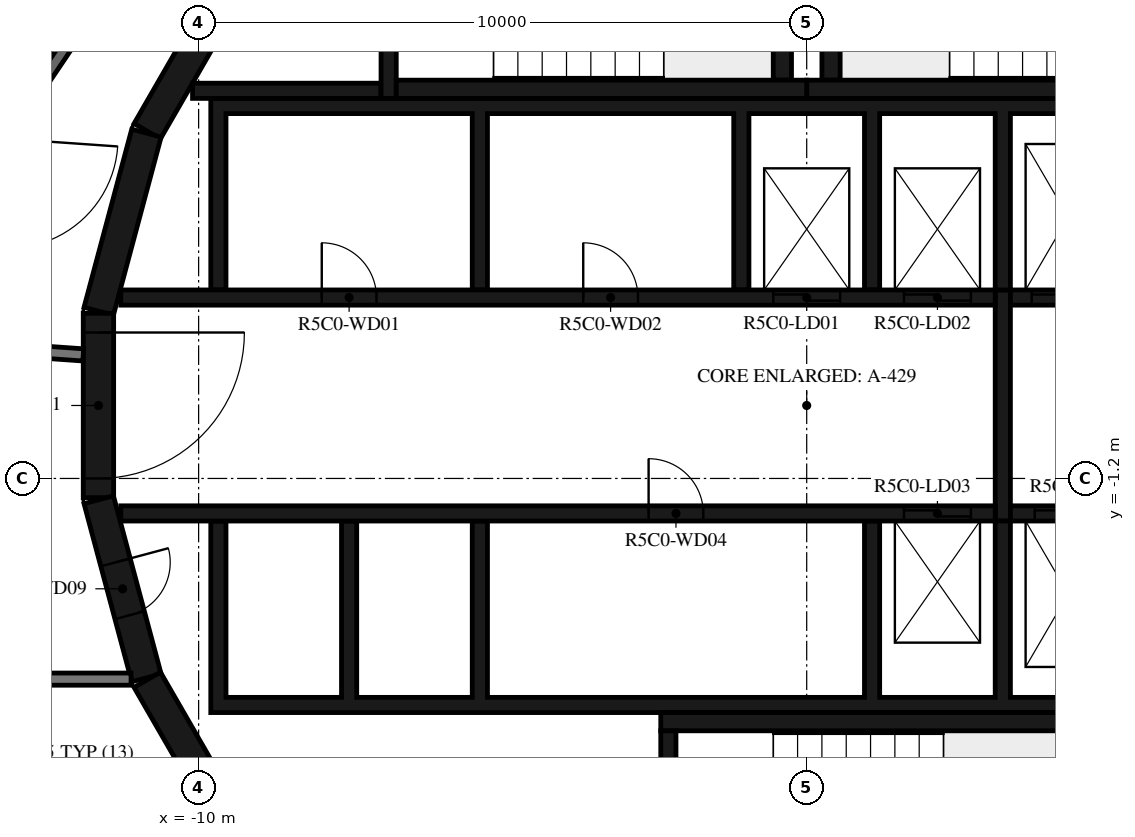
"""IFC4 building model, lengths in metres.
Left out: names, types, materials, properties, quantities, classifications, styles, units other than length and angle.
Written with IfcOpenShell. Run it as: python <this file> out.ifc"""

import sys

from ifc_helpers import new_model, si_unit, direction, frame, frame_2d, origin, place, context, subcontext, project, spatial, polyline, rectangle, outline, extrude, element, fill, save


model = new_model("IFC4")
c1 = context("Model", 3, precision=1e-05, world=origin(), true_north=direction((0.0, 1.0)))
c2 = subcontext(c1, "Body", "Model", "MODEL_VIEW")
j1 = project(units=[si_unit("LENGTHUNIT", "METRE"), si_unit("PLANEANGLEUNIT", "RADIAN")], contexts=[c1])
p1 = place(None, origin())
s1 = spatial("IfcSite", under=j1, at=p1, CompositionType="ELEMENT")
p2 = place(p1, origin())
s2 = spatial("IfcBuilding", under=s1, at=p2, CompositionType="ELEMENT")
p3 = place(p2, frame((0.0, 0.0, 209.4)))
s3 = spatial("IfcBuildingStorey", under=s2, at=p3, CompositionType="ELEMENT", Elevation=209.4)
for number, where, z_axis, x_axis in (
    (1, (-9.329, 7.137, 0.0), (0.0, 0.0, 1.0), (-0.5, -0.866, 0.0)),
    (2, (-10.858, 4.479, 0.0), (0.0, 0.0, 1.0), (-0.259, -0.966, 0.0)),
):
    element("IfcWall", number, at=place(p3, frame(where, z_axis=z_axis, x_axis=x_axis)), inside=s3, PredefinedType="SHEAR", context=c2, shape_type="SweptSolid", body=[
        extrude(rectangle(XDim=3.033, YDim=0.5, at=frame_2d((1.516, 0.0))), origin(), (0.0, 0.0, 1.0), 3.12),
    ])
p4 = place(p3, frame((-11.647, 1.516, 0.0), z_axis=(0.0, 0.0, 1.0), x_axis=(0.0, -1.0, 0.0)))
e3 = element("IfcWall", 3, at=p4, inside=s3, PredefinedType="SHEAR", context=c2, shape_type="SweptSolid", body=[
    extrude(rectangle(XDim=3.033, YDim=0.5, at=frame_2d((1.516, 0.0))), origin(), (0.0, 0.0, 1.0), 3.12),
])
p5 = place(p4, frame((0.316, 0.0, 0.0)))
e4 = element("IfcOpeningElement", 4, at=p5, cuts=e3, PredefinedType="OPENING", context=c2, shape_type="SweptSolid", body=[
    extrude(rectangle(XDim=2.4, YDim=2.1, at=frame_2d((1.2, 1.05))), frame((0.0, 0.26, 0.0), z_axis=(0.0, -1.0, 0.0), x_axis=(1.0, 0.0, 0.0)), (0.0, 0.0, 1.0), 0.52),
])
p6 = place(p3, frame((-11.643, -1.55, 0.0), z_axis=(0.0, 0.0, 1.0), x_axis=(0.258734743916, -0.965948410781, 0.0)))
e5 = element("IfcWall", 5, at=p6, inside=s3, PredefinedType="SHEAR", context=c2, shape_type="SweptSolid", body=[
    extrude(rectangle(XDim=3.033, YDim=0.5, at=frame_2d((1.516, 0.0))), origin(), (0.0, 0.0, 1.0), 3.12),
])
p7 = place(p6, frame((1.066, 0.0, 0.0)))
e6 = element("IfcOpeningElement", 6, at=p7, cuts=e5, PredefinedType="OPENING", context=c2, shape_type="SweptSolid", body=[
    extrude(rectangle(XDim=0.9, YDim=2.1, at=frame_2d((0.45, 1.05))), frame((0.0, 0.26, 0.0), z_axis=(0.0, -1.0, 0.0), x_axis=(1.0, 0.0, 0.0)), (0.0, 0.0, 1.0), 0.52),
])
p8 = place(p3, frame((-10.845, -4.51, 0.0), z_axis=(0.0, 0.0, 1.0), x_axis=(0.500087131594, -0.865975092491, 0.0)))
e7 = element("IfcWall", 7, at=p8, inside=s3, PredefinedType="SHEAR", context=c2, shape_type="SweptSolid", body=[
    extrude(rectangle(XDim=3.033, YDim=0.5, at=frame_2d((1.516, 0.0))), origin(), (0.0, 0.0, 1.0), 3.12),
])
p9 = place(p3, frame((0.0, 5.2, 0.0), z_axis=(0.0, 0.0, 1.0), x_axis=(1.0, 0.0, 0.0)))
e8 = element("IfcWall", 8, at=p9, inside=s3, PredefinedType="SHEAR", context=c2, shape_type="SweptSolid", body=[
    extrude(rectangle(XDim=6.75, YDim=0.3, at=frame_2d((3.375, 0.0))), origin(), (0.0, 0.0, 1.0), 3.12),
])
p10 = place(p3, frame((0.4, 5.35, 0.0), z_axis=(0.0, 0.0, 1.0), x_axis=(0.0, 1.0, 0.0)))
e9 = element("IfcWall", 9, at=p10, inside=s3, PredefinedType="SHEAR", context=c2, shape_type="SweptSolid", body=[
    extrude(rectangle(XDim=3.32, YDim=0.3, at=frame_2d((1.66, 0.0))), origin(), (0.0, 0.0, 1.0), 3.12),
])
p11 = place(p3, frame((-6.75, 5.2, 0.0), z_axis=(0.0, 0.0, 1.0), x_axis=(1.0, 0.0, 0.0)))
e10 = element("IfcWall", 10, at=p11, inside=s3, PredefinedType="SHEAR", context=c2, shape_type="SweptSolid", body=[
    extrude(rectangle(XDim=6.75, YDim=0.3, at=frame_2d((3.375, 0.0))), origin(), (0.0, 0.0, 1.0), 3.12),
])
p12 = place(p3, frame((-0.4, 5.35, 0.0), z_axis=(0.0, 0.0, 1.0), x_axis=(0.0, 1.0, 0.0)))
e11 = element("IfcWall", 11, at=p12, inside=s3, PredefinedType="SHEAR", context=c2, shape_type="SweptSolid", body=[
    extrude(rectangle(XDim=3.32, YDim=0.3, at=frame_2d((1.66, 0.0))), origin(), (0.0, 0.0, 1.0), 3.12),
])
p13 = place(p3, frame((-6.875, 8.97, 0.0), z_axis=(0.0, 0.0, 1.0), x_axis=(0.0, -1.0, 0.0)))
e12 = element("IfcWall", 12, at=p13, inside=s3, PredefinedType="SHEAR", context=c2, shape_type="SweptSolid", body=[
    extrude(rectangle(XDim=3.92, YDim=0.25, at=frame_2d((1.96, 0.0))), origin(), (0.0, 0.0, 1.0), 3.12),
])
p14 = place(p13, frame((1.61, 0.0, 0.0)))
e13 = element("IfcOpeningElement", 13, at=p14, cuts=e12, PredefinedType="OPENING", context=c2, shape_type="SweptSolid", body=[
    extrude(rectangle(XDim=1.2, YDim=2.1, at=frame_2d((0.6, 1.05))), frame((0.0, 0.135, 0.0), z_axis=(0.0, -1.0, 0.0), x_axis=(1.0, 0.0, 0.0)), (0.0, 0.0, 1.0), 0.27),
])
p15 = place(p3, frame((-7.0, 5.175, 0.0), z_axis=(0.0, 0.0, 1.0), x_axis=(-1.0, 0.0, 0.0)))
e14 = element("IfcWall", 14, at=p15, inside=s3, PredefinedType="SHEAR", context=c2, shape_type="SweptSolid", body=[
    extrude(rectangle(XDim=3.1, YDim=0.25, at=frame_2d((1.55, 0.0))), origin(), (0.0, 0.0, 1.0), 3.12),
])
p16 = place(p3, frame((-2.275, -8.67, 0.0), z_axis=(0.0, 0.0, 1.0), x_axis=(0.0, 1.0, 0.0)))
e15 = element("IfcWall", 15, at=p16, inside=s3, PredefinedType="SHEAR", context=c2, shape_type="SweptSolid", body=[
    extrude(rectangle(XDim=3.32, YDim=0.25, at=frame_2d((1.66, 0.0))), origin(), (0.0, 0.0, 1.0), 3.12),
])
p17 = place(p3, frame((-2.4, -5.2, 0.0), z_axis=(0.0, 0.0, 1.0), x_axis=(1.0, 0.0, 0.0)))
e16 = element("IfcWall", 16, at=p17, inside=s3, PredefinedType="SHEAR", context=c2, shape_type="SweptSolid", body=[
    extrude(rectangle(XDim=7.05, YDim=0.3, at=frame_2d((3.525, 0.0))), origin(), (0.0, 0.0, 1.0), 3.12),
])
p18 = place(p3, origin())
e17 = element("IfcWall", 17, at=p18, inside=s3, PredefinedType="SHEAR", context=c2, shape_type="SweptSolid", body=[
    extrude(outline(polyline([(-9.55, 4.8), (-5.5, 4.8), (-5.5, 1.9), (-5.25, 1.9), (-5.25, 4.8), (-1.2, 4.8), (-1.2, 1.9), (-0.95, 1.9), (-0.95, 4.8), (0.95, 4.8), (0.95, 1.9), (1.2, 1.9), (1.2, 4.8), (3.1, 4.8), (3.1, 1.9), (3.35, 1.9), (3.35, 4.8), (5.25, 4.8), (5.25, 1.9), (5.5, 1.9), (5.5, 4.8), (7.4, 4.8), (7.4, 1.9), (7.65, 1.9), (7.65, 4.8), (9.55, 4.8), (9.55, 1.9), (9.8, 1.9), (9.8, 4.8), (9.8, 5.05), (-9.8, 5.05), (-9.8, 4.8), (-9.8, 1.9), (-9.55, 1.9), (-9.55, 4.8)])), origin(), (0.0, 0.0, 1.0), 3.12),
])
p19 = place(p3, origin())
e18 = element("IfcWall", 18, at=p19, inside=s3, PredefinedType="SHEAR", context=c2, shape_type="SweptSolid", body=[
    extrude(outline(polyline([(9.8, -5.05), (9.8, -4.8), (9.8, -1.9), (9.55, -1.9), (9.55, -4.8), (7.65, -4.8), (7.65, -1.9), (7.4, -1.9), (7.4, -4.8), (5.5, -4.8), (5.5, -1.9), (5.25, -1.9), (5.25, -4.8), (3.35, -4.8), (3.35, -1.9), (3.1, -1.9), (3.1, -4.8), (1.2, -4.8), (1.2, -1.9), (0.95, -1.9), (0.95, -4.8), (-5.25, -4.8), (-5.25, -1.9), (-5.5, -1.9), (-5.5, -4.8), (-7.4, -4.8), (-7.4, -1.9), (-7.65, -1.9), (-7.65, -4.8), (-9.55, -4.8), (-9.55, -1.9), (-9.8, -1.9), (-9.8, -4.8), (-9.8, -5.05), (9.8, -5.05)])), origin(), (0.0, 0.0, 1.0), 3.12),
])
p20 = place(p3, frame((-11.28, 1.775, 0.0), z_axis=(0.0, 0.0, 1.0), x_axis=(1.0, 0.0, 0.0)))
e19 = element("IfcWall", 19, at=p20, inside=s3, PredefinedType="SHEAR", context=c2, shape_type="SweptSolid", body=[
    extrude(rectangle(XDim=14.38, YDim=0.25, at=frame_2d((7.19, 0.0))), origin(), (0.0, 0.0, 1.0), 3.12),
])
p21 = place(p20, frame((10.73, 0.0, 0.0)))
e20 = element("IfcOpeningElement", 20, at=p21, cuts=e19, PredefinedType="OPENING", context=c2, shape_type="SweptSolid", body=[
    extrude(rectangle(XDim=1.1, YDim=2.1, at=frame_2d((0.55, 1.05))), frame((0.0, 0.135, 0.0), z_axis=(0.0, -1.0, 0.0), x_axis=(1.0, 0.0, 0.0)), (0.0, 0.0, 1.0), 0.27),
])
p22 = place(p20, frame((12.88, 0.0, 0.0)))
e21 = element("IfcOpeningElement", 21, at=p22, cuts=e19, PredefinedType="OPENING", context=c2, shape_type="SweptSolid", body=[
    extrude(rectangle(XDim=1.1, YDim=2.1, at=frame_2d((0.55, 1.05))), frame((0.0, 0.135, 0.0), z_axis=(0.0, -1.0, 0.0), x_axis=(1.0, 0.0, 0.0)), (0.0, 0.0, 1.0), 0.27),
])
p23 = place(p20, frame((3.305, 0.0, 0.0)))
e22 = element("IfcOpeningElement", 22, at=p23, cuts=e19, PredefinedType="OPENING", context=c2, shape_type="SweptSolid", body=[
    extrude(rectangle(XDim=0.9, YDim=2.1, at=frame_2d((0.45, 1.05))), frame((0.0, 0.135, 0.0), z_axis=(0.0, -1.0, 0.0), x_axis=(1.0, 0.0, 0.0)), (0.0, 0.0, 1.0), 0.27),
])
p24 = place(p20, frame((7.605, 0.0, 0.0)))
e23 = element("IfcOpeningElement", 23, at=p24, cuts=e19, PredefinedType="OPENING", context=c2, shape_type="SweptSolid", body=[
    extrude(rectangle(XDim=0.9, YDim=2.1, at=frame_2d((0.45, 1.05))), frame((0.0, 0.135, 0.0), z_axis=(0.0, -1.0, 0.0), x_axis=(1.0, 0.0, 0.0)), (0.0, 0.0, 1.0), 0.27),
])
p25 = place(p3, frame((3.35, 1.775, 0.0), z_axis=(0.0, 0.0, 1.0), x_axis=(1.0, 0.0, 0.0)))
e24 = element("IfcWall", 24, at=p25, inside=s3, PredefinedType="SHEAR", context=c2, shape_type="SweptSolid", body=[
    extrude(rectangle(XDim=7.93, YDim=0.25, at=frame_2d((3.965, 0.0))), origin(), (0.0, 0.0, 1.0), 3.12),
])
p26 = place(p25, frame((0.35, 0.0, 0.0)))
e25 = element("IfcOpeningElement", 25, at=p26, cuts=e24, PredefinedType="OPENING", context=c2, shape_type="SweptSolid", body=[
    extrude(rectangle(XDim=1.2, YDim=2.4, at=frame_2d((0.6, 1.2))), frame((0.0, 0.135, 0.0), z_axis=(0.0, -1.0, 0.0), x_axis=(1.0, 0.0, 0.0)), (0.0, 0.0, 1.0), 0.27),
])
p27 = place(p25, frame((2.5, 0.0, 0.0)))
e26 = element("IfcOpeningElement", 26, at=p27, cuts=e24, PredefinedType="OPENING", context=c2, shape_type="SweptSolid", body=[
    extrude(rectangle(XDim=1.2, YDim=2.4, at=frame_2d((0.6, 1.2))), frame((0.0, 0.135, 0.0), z_axis=(0.0, -1.0, 0.0), x_axis=(1.0, 0.0, 0.0)), (0.0, 0.0, 1.0), 0.27),
])
p28 = place(p25, frame((4.8, 0.0, 0.0)))
e27 = element("IfcOpeningElement", 27, at=p28, cuts=e24, PredefinedType="OPENING", context=c2, shape_type="SweptSolid", body=[
    extrude(rectangle(XDim=0.9, YDim=2.1, at=frame_2d((0.45, 1.05))), frame((0.0, 0.135, 0.0), z_axis=(0.0, -1.0, 0.0), x_axis=(1.0, 0.0, 0.0)), (0.0, 0.0, 1.0), 0.27),
])
p29 = place(p3, frame((-11.28, -1.775, 0.0), z_axis=(0.0, 0.0, 1.0), x_axis=(1.0, 0.0, 0.0)))
e28 = element("IfcWall", 28, at=p29, inside=s3, PredefinedType="SHEAR", context=c2, shape_type="SweptSolid", body=[
    extrude(rectangle(XDim=14.38, YDim=0.25, at=frame_2d((7.19, 0.0))), origin(), (0.0, 0.0, 1.0), 3.12),
])
p30 = place(p29, frame((12.88, 0.0, 0.0)))
e29 = element("IfcOpeningElement", 29, at=p30, cuts=e28, PredefinedType="OPENING", context=c2, shape_type="SweptSolid", body=[
    extrude(rectangle(XDim=1.1, YDim=2.1, at=frame_2d((0.55, 1.05))), frame((0.0, 0.135, 0.0), z_axis=(0.0, -1.0, 0.0), x_axis=(1.0, 0.0, 0.0)), (0.0, 0.0, 1.0), 0.27),
])
p31 = place(p29, frame((8.68, 0.0, 0.0)))
e30 = element("IfcOpeningElement", 30, at=p31, cuts=e28, PredefinedType="OPENING", context=c2, shape_type="SweptSolid", body=[
    extrude(rectangle(XDim=0.9, YDim=2.1, at=frame_2d((0.45, 1.05))), frame((0.0, 0.135, 0.0), z_axis=(0.0, -1.0, 0.0), x_axis=(1.0, 0.0, 0.0)), (0.0, 0.0, 1.0), 0.27),
])
p32 = place(p3, frame((3.35, -1.775, 0.0), z_axis=(0.0, 0.0, 1.0), x_axis=(1.0, 0.0, 0.0)))
e31 = element("IfcWall", 31, at=p32, inside=s3, PredefinedType="SHEAR", context=c2, shape_type="SweptSolid", body=[
    extrude(rectangle(XDim=7.93, YDim=0.25, at=frame_2d((3.965, 0.0))), origin(), (0.0, 0.0, 1.0), 3.12),
])
p33 = place(p32, frame((0.4, 0.0, 0.0)))
e32 = element("IfcOpeningElement", 32, at=p33, cuts=e31, PredefinedType="OPENING", context=c2, shape_type="SweptSolid", body=[
    extrude(rectangle(XDim=1.1, YDim=2.4, at=frame_2d((0.55, 1.2))), frame((0.0, 0.135, 0.0), z_axis=(0.0, -1.0, 0.0), x_axis=(1.0, 0.0, 0.0)), (0.0, 0.0, 1.0), 0.27),
])
p34 = place(p32, frame((2.55, 0.0, 0.0)))
e33 = element("IfcOpeningElement", 33, at=p34, cuts=e31, PredefinedType="OPENING", context=c2, shape_type="SweptSolid", body=[
    extrude(rectangle(XDim=1.1, YDim=2.4, at=frame_2d((0.55, 1.2))), frame((0.0, 0.135, 0.0), z_axis=(0.0, -1.0, 0.0), x_axis=(1.0, 0.0, 0.0)), (0.0, 0.0, 1.0), 0.27),
])
p35 = place(p32, frame((4.7, 0.0, 0.0)))
e34 = element("IfcOpeningElement", 34, at=p35, cuts=e31, PredefinedType="OPENING", context=c2, shape_type="SweptSolid", body=[
    extrude(rectangle(XDim=1.1, YDim=2.4, at=frame_2d((0.55, 1.2))), frame((0.0, 0.135, 0.0), z_axis=(0.0, -1.0, 0.0), x_axis=(1.0, 0.0, 0.0)), (0.0, 0.0, 1.0), 0.27),
])
p36 = place(p3, frame((3.225, -1.9, 0.0), z_axis=(0.0, 0.0, 1.0), x_axis=(0.0, 1.0, 0.0)))
e35 = element("IfcWall", 35, at=p36, inside=s3, PredefinedType="SHEAR", context=c2, shape_type="SweptSolid", body=[
    extrude(rectangle(XDim=3.8, YDim=0.25, at=frame_2d((1.9, 0.0))), origin(), (0.0, 0.0, 1.0), 3.12),
])
p37 = place(p3, frame((-13.367, 0.935, 0.0), z_axis=(0.0, 0.0, 1.0), x_axis=(0.997553656289, -0.069904955655, 0.0)))
e36 = element("IfcWall", 36, at=p37, inside=s3, PredefinedType="STANDARD", context=c2, shape_type="SweptSolid", body=[
    extrude(rectangle(XDim=1.474, YDim=0.2, at=frame_2d((0.737, 0.0))), origin(), (0.0, 0.0, 1.0), 3.12),
])
p38 = place(p3, frame((-9.101, 10.47, 0.0), z_axis=(0.0, 0.0, 1.0), x_axis=(-0.559195469534, -0.829035841718, 0.0)))
e37 = element("IfcWall", 37, at=p38, inside=s3, PredefinedType="STANDARD", context=c2, shape_type="SweptSolid", body=[
    extrude(rectangle(XDim=7.181, YDim=0.2, at=frame_2d((3.591, 0.0))), origin(), (0.0, 0.0, 1.0), 3.12),
])
p39 = place(p38, frame((1.0, 0.0, 0.0)))
e38 = element("IfcOpeningElement", 38, at=p39, cuts=e37, PredefinedType="OPENING", context=c2, shape_type="SweptSolid", body=[
    extrude(rectangle(XDim=1.0, YDim=2.1, at=frame_2d((0.5, 1.05))), frame((0.0, 0.11, 0.0), z_axis=(0.0, -1.0, 0.0), x_axis=(1.0, 0.0, 0.0)), (0.0, 0.0, 1.0), 0.22),
])
p40 = place(p3, frame((-18.55, -4.5, 0.0), z_axis=(0.0, 0.0, 1.0), x_axis=(1.0, 0.0, 0.0)))
e39 = element("IfcWall", 39, at=p40, inside=s3, PredefinedType="STANDARD", context=c2, shape_type="SweptSolid", body=[
    extrude(rectangle(XDim=7.438, YDim=0.2, at=frame_2d((3.719, 0.0))), origin(), (0.0, 0.0, 1.0), 3.12),
])
p41 = place(p3, frame((-10.12, 11.642, 0.0), z_axis=(0.0, 0.0, 1.0), x_axis=(-0.55920080659, -0.829032241779, 0.0)))
e40 = element("IfcWall", 40, at=p41, inside=s3, PredefinedType="PARTITIONING", context=c2, shape_type="SweptSolid", body=[
    extrude(rectangle(XDim=7.985, YDim=0.12, at=frame_2d((3.992, 0.0))), origin(), (0.0, 0.0, 1.0), 3.12),
])
p42 = place(p41, frame((4.346, 0.0, 0.0)))
e41 = element("IfcOpeningElement", 41, at=p42, cuts=e40, PredefinedType="OPENING", context=c2, shape_type="SweptSolid", body=[
    extrude(rectangle(XDim=0.9, YDim=2.1, at=frame_2d((0.45, 1.05))), frame((0.0, 0.07, 0.0), z_axis=(0.0, -1.0, 0.0), x_axis=(1.0, 0.0, 0.0)), (0.0, 0.0, 1.0), 0.14),
])
p43 = place(p3, frame((-14.383, -4.5, 0.0), z_axis=(0.0, 0.0, 1.0), x_axis=(0.438393414895, -0.898783185077, 0.0)))
e42 = element("IfcWall", 42, at=p43, inside=s3, PredefinedType="PARTITIONING", context=c2, shape_type="SweptSolid", body=[
    extrude(rectangle(XDim=6.049, YDim=0.12, at=frame_2d((3.024, 0.0))), origin(), (0.0, 0.0, 1.0), 3.12),
])
p44 = place(p43, frame((0.4, 0.0, 0.0)))
e43 = element("IfcOpeningElement", 43, at=p44, cuts=e42, PredefinedType="OPENING", context=c2, shape_type="SweptSolid", body=[
    extrude(rectangle(XDim=0.8, YDim=2.1, at=frame_2d((0.4, 1.05))), frame((0.0, 0.07, 0.0), z_axis=(0.0, -1.0, 0.0), x_axis=(1.0, 0.0, 0.0)), (0.0, 0.0, 1.0), 0.14),
])
p45 = place(p5, origin())
e44 = element("IfcDoor", 44, at=p45, inside=s3, OperationType="DOUBLE_DOOR_SINGLE_SWING", PredefinedType="DOOR", context=c2, shape_type="SweptSolid", body=[
    extrude(rectangle(XDim=2.4, YDim=2.1, at=frame_2d((1.2, 1.05))), frame((0.0, 0.025, 0.0), z_axis=(0.0, -1.0, 0.0), x_axis=(1.0, 0.0, 0.0)), (0.0, 0.0, 1.0), 0.05),
])
fill(e4, e44)
p46 = place(p21, origin())
e45 = element("IfcDoor", 45, at=p46, inside=s3, OperationType="DOUBLE_DOOR_SLIDING", PredefinedType="DOOR", context=c2, shape_type="SweptSolid", body=[
    extrude(rectangle(XDim=1.1, YDim=2.1, at=frame_2d((0.55, 1.05))), frame((0.0, 0.025, 0.0), z_axis=(0.0, -1.0, 0.0), x_axis=(1.0, 0.0, 0.0)), (0.0, 0.0, 1.0), 0.05),
])
fill(e20, e45)
p47 = place(p22, origin())
e46 = element("IfcDoor", 46, at=p47, inside=s3, OperationType="DOUBLE_DOOR_SLIDING", PredefinedType="DOOR", context=c2, shape_type="SweptSolid", body=[
    extrude(rectangle(XDim=1.1, YDim=2.1, at=frame_2d((0.55, 1.05))), frame((0.0, 0.025, 0.0), z_axis=(0.0, -1.0, 0.0), x_axis=(1.0, 0.0, 0.0)), (0.0, 0.0, 1.0), 0.05),
])
fill(e21, e46)
p48 = place(p26, origin())
e47 = element("IfcDoor", 47, at=p48, inside=s3, OperationType="DOUBLE_DOOR_SLIDING", PredefinedType="DOOR", context=c2, shape_type="SweptSolid", body=[
    extrude(rectangle(XDim=1.2, YDim=2.4, at=frame_2d((0.6, 1.2))), frame((0.0, 0.025, 0.0), z_axis=(0.0, -1.0, 0.0), x_axis=(1.0, 0.0, 0.0)), (0.0, 0.0, 1.0), 0.05),
])
fill(e25, e47)
p49 = place(p30, origin())
e48 = element("IfcDoor", 48, at=p49, inside=s3, OperationType="DOUBLE_DOOR_SLIDING", PredefinedType="DOOR", context=c2, shape_type="SweptSolid", body=[
    extrude(rectangle(XDim=1.1, YDim=2.1, at=frame_2d((0.55, 1.05))), frame((0.0, 0.025, 0.0), z_axis=(0.0, -1.0, 0.0), x_axis=(1.0, 0.0, 0.0)), (0.0, 0.0, 1.0), 0.05),
])
fill(e29, e48)
p50 = place(p33, origin())
e49 = element("IfcDoor", 49, at=p50, inside=s3, OperationType="DOUBLE_DOOR_SLIDING", PredefinedType="DOOR", context=c2, shape_type="SweptSolid", body=[
    extrude(rectangle(XDim=1.1, YDim=2.4, at=frame_2d((0.55, 1.2))), frame((0.0, 0.025, 0.0), z_axis=(0.0, -1.0, 0.0), x_axis=(1.0, 0.0, 0.0)), (0.0, 0.0, 1.0), 0.05),
])
fill(e32, e49)
p51 = place(p23, origin())
e50 = element("IfcDoor", 50, at=p51, inside=s3, OperationType="SINGLE_SWING_LEFT", PredefinedType="DOOR", context=c2, shape_type="SweptSolid", body=[
    extrude(rectangle(XDim=0.9, YDim=2.1, at=frame_2d((0.45, 1.05))), frame((0.0, 0.025, 0.0), z_axis=(0.0, -1.0, 0.0), x_axis=(1.0, 0.0, 0.0)), (0.0, 0.0, 1.0), 0.05),
])
fill(e22, e50)
p52 = place(p24, origin())
e51 = element("IfcDoor", 51, at=p52, inside=s3, OperationType="SINGLE_SWING_RIGHT", PredefinedType="DOOR", context=c2, shape_type="SweptSolid", body=[
    extrude(rectangle(XDim=0.9, YDim=2.1, at=frame_2d((0.45, 1.05))), frame((0.0, 0.025, 0.0), z_axis=(0.0, -1.0, 0.0), x_axis=(1.0, 0.0, 0.0)), (0.0, 0.0, 1.0), 0.05),
])
fill(e23, e51)
p53 = place(p31, origin())
e52 = element("IfcDoor", 52, at=p53, inside=s3, OperationType="SINGLE_SWING_RIGHT", PredefinedType="DOOR", context=c2, shape_type="SweptSolid", body=[
    extrude(rectangle(XDim=0.9, YDim=2.1, at=frame_2d((0.45, 1.05))), frame((0.0, 0.025, 0.0), z_axis=(0.0, -1.0, 0.0), x_axis=(1.0, 0.0, 0.0)), (0.0, 0.0, 1.0), 0.05),
])
fill(e30, e52)
p54 = place(p7, origin())
e53 = element("IfcDoor", 53, at=p54, inside=s3, OperationType="SINGLE_SWING_LEFT", PredefinedType="DOOR", context=c2, shape_type="SweptSolid", body=[
    extrude(rectangle(XDim=0.9, YDim=2.1, at=frame_2d((0.45, 1.05))), frame((0.0, 0.025, 0.0), z_axis=(0.0, -1.0, 0.0), x_axis=(1.0, 0.0, 0.0)), (0.0, 0.0, 1.0), 0.05),
])
fill(e6, e53)
save(model, sys.argv[1])
